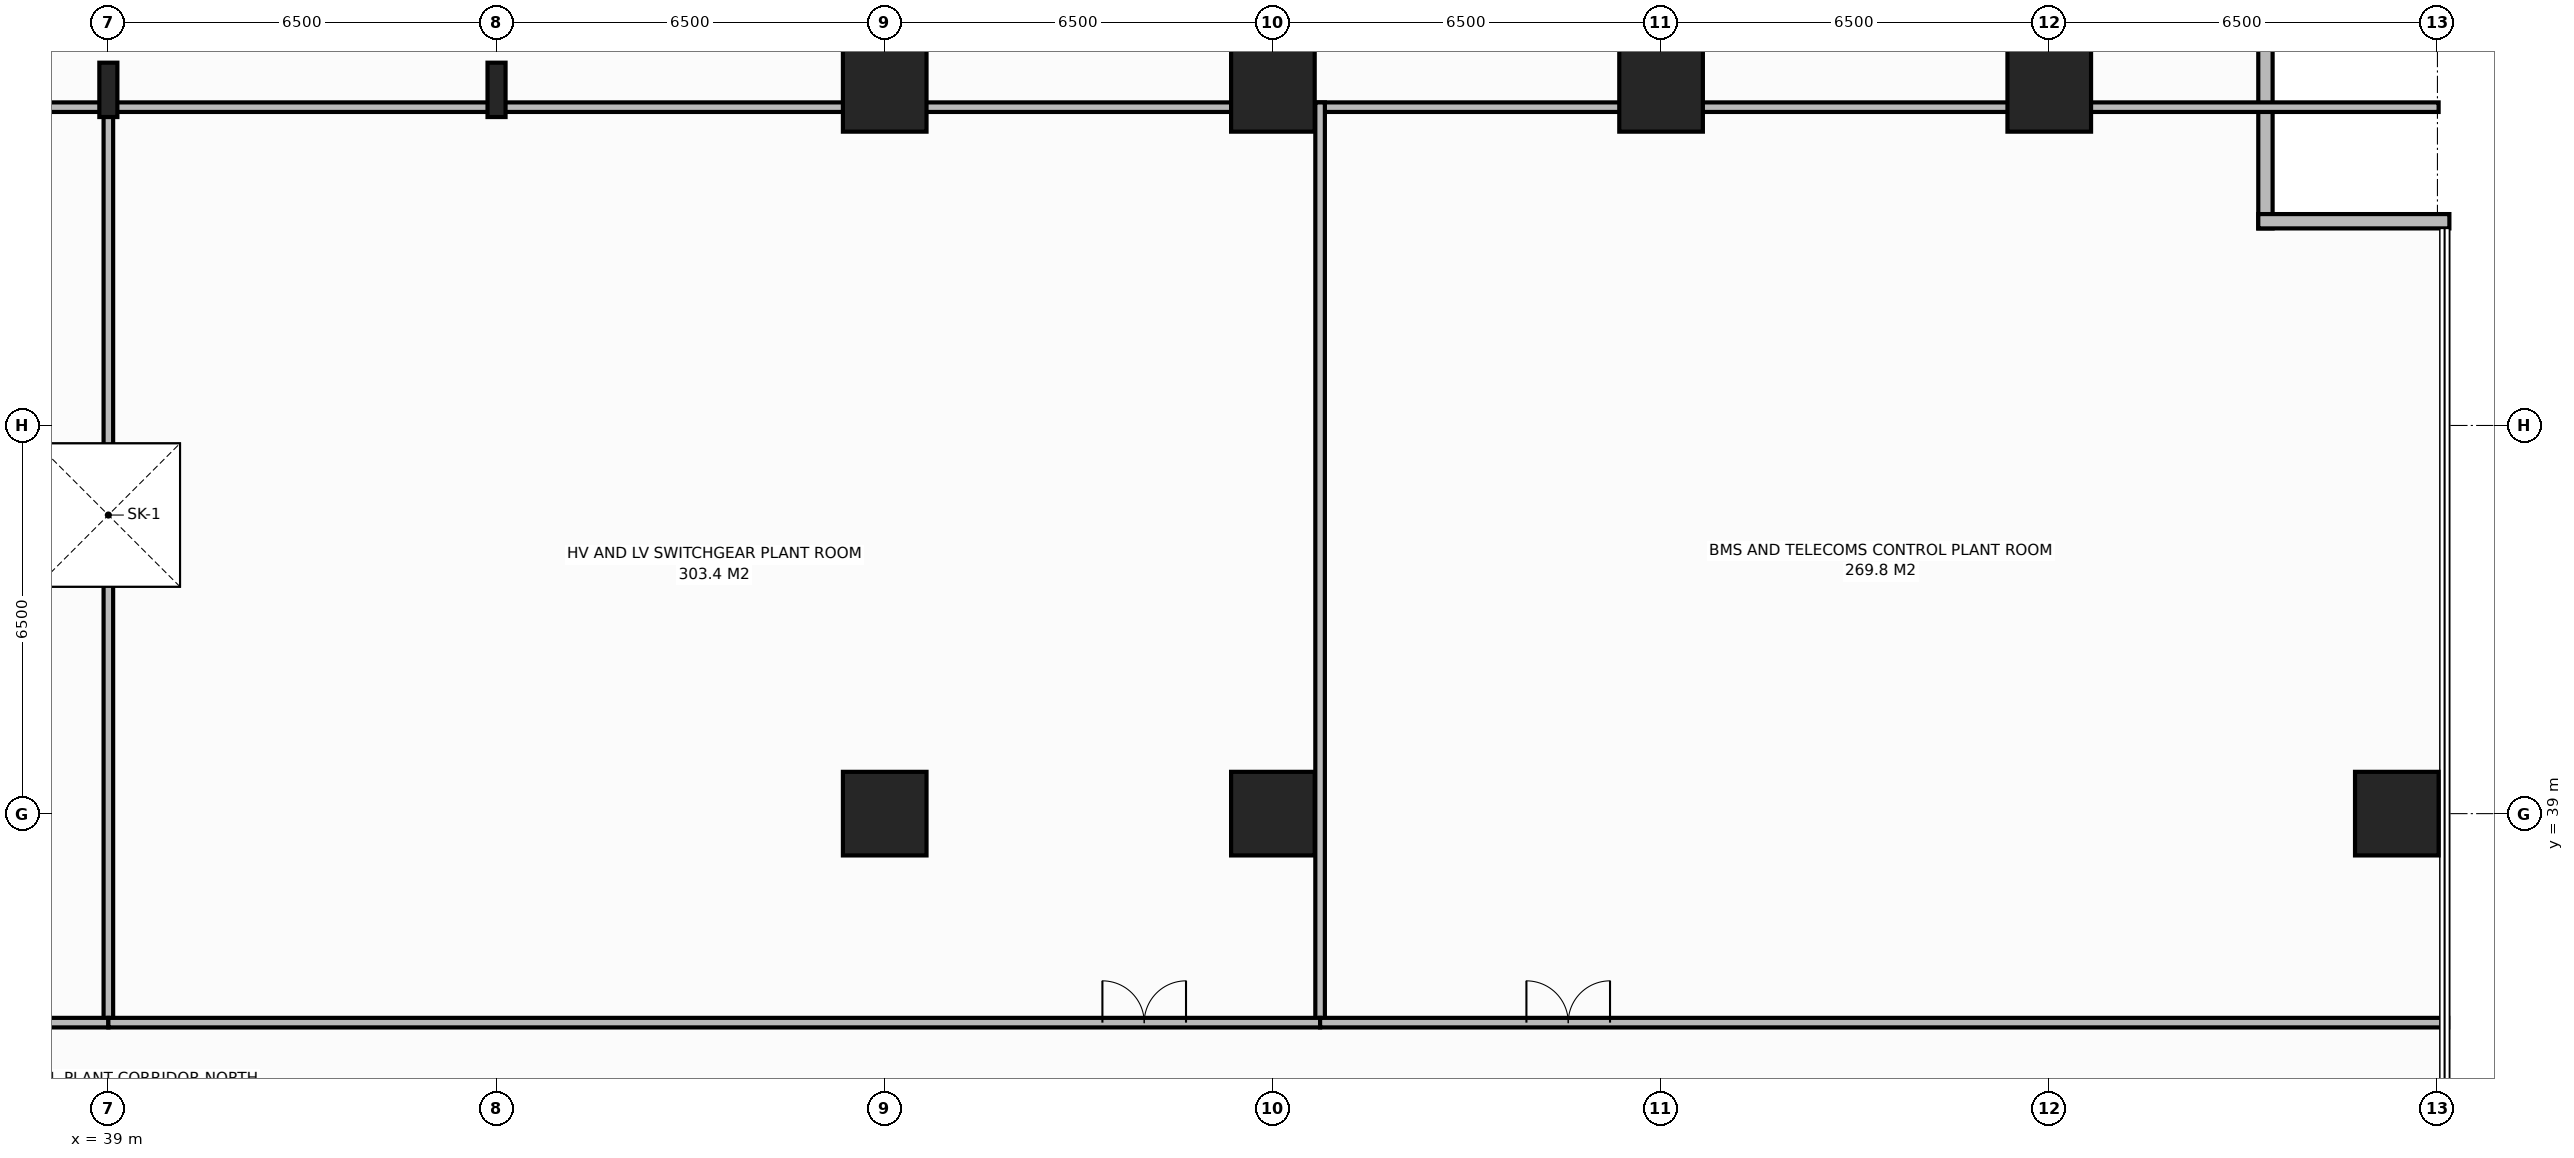
"""IFC4 building model, lengths in metres.
Left out: names, types, materials, properties, quantities, classifications, styles, units other than length and angle.
Written with IfcOpenShell. Run it as: python <this file> out.ifc"""

import sys

from ifc_helpers import new_model, si_unit, direction, frame, frame_2d, origin, origin_2d, place, context, subcontext, project, spatial, rectangle, i_section, extrude, element, fill, save


model = new_model("IFC4")
c1 = context("Model", 3, precision=1e-05, world=origin(), true_north=direction((0.0, 1.0)))
c2 = subcontext(c1, "Body", "Model", "MODEL_VIEW")
j1 = project(units=[si_unit("LENGTHUNIT", "METRE"), si_unit("PLANEANGLEUNIT", "RADIAN")], contexts=[c1])
p1 = place(None, origin())
s1 = spatial("IfcSite", under=j1, at=p1, CompositionType="ELEMENT")
p2 = place(p1, origin())
s2 = spatial("IfcBuilding", under=s1, at=p2, CompositionType="ELEMENT")
p3 = place(p2, frame((0.0, 0.0, 22.0)))
s3 = spatial("IfcBuildingStorey", under=s2, at=p3, CompositionType="ELEMENT", Elevation=22.0)
for number, where, z_axis, x_axis in (
    (1, (58.5, 39.0, 0.0), (0.0, 0.0, 1.0), (1.0, 0.0, 0.0)),
    (2, (52.0, 39.0, 0.0), (0.0, 0.0, 1.0), (1.0, 0.0, 0.0)),
    (3, (52.0, 51.12, 0.0), (0.0, 0.0, 1.0), (1.0, 0.0, 0.0)),
    (4, (58.5, 51.12, 0.0), (0.0, 0.0, 1.0), (1.0, 0.0, 0.0)),
    (5, (65.0, 51.12, 0.0), (0.0, 0.0, 1.0), (1.0, 0.0, 0.0)),
    (6, (71.5, 51.12, 0.0), (0.0, 0.0, 1.0), (1.0, 0.0, 0.0)),
    (7, (77.32, 39.0, 0.0), (0.0, 0.0, 1.0), (1.0, 0.0, 0.0)),
):
    element("IfcColumn", number, at=place(p3, frame(where, z_axis=z_axis, x_axis=x_axis)), inside=s3, PredefinedType="COLUMN", context=c2, shape_type="SweptSolid", body=[
        extrude(rectangle(XDim=1.4, YDim=1.4, at=origin_2d()), origin(), (0.0, 0.0, 1.0), 5.8),
    ])
for number, where, z_axis, x_axis in (
    (8, (39.0, 51.12, 0.0), (0.0, 0.0, 1.0), (1.0, 0.0, 0.0)),
    (9, (45.5, 51.12, 0.0), (0.0, 0.0, 1.0), (1.0, 0.0, 0.0)),
):
    element("IfcColumn", number, at=place(p3, frame(where, z_axis=z_axis, x_axis=x_axis)), inside=s3, PredefinedType="COLUMN", context=c2, shape_type="SweptSolid", body=[
        extrude(i_section(OverallWidth=0.302, OverallDepth=0.91, WebThickness=0.021, FlangeThickness=0.04, at=origin_2d()), origin(), (0.0, 0.0, 1.0), 5.8),
    ])
for number, where, z_axis, x_axis in (
    (10, (75.12, 52.0, 0.0), (0.0, 0.0, 1.0), (0.0, -1.0, 0.0)),
    (11, (75.0, 48.92, 0.0), (0.0, 0.0, 1.0), (1.0, 0.0, 0.0)),
):
    element("IfcWall", number, at=place(p3, frame(where, z_axis=z_axis, x_axis=x_axis)), inside=s3, PredefinedType="STANDARD", context=c2, shape_type="SweptSolid", body=[
        extrude(rectangle(XDim=3.2, YDim=0.24, at=frame_2d((1.6, 0.0))), origin(), (0.0, 0.0, 1.0), 5.55),
    ])
p4 = place(p3, frame((-0.02, 50.83, 0.0), z_axis=(0.0, 0.0, 1.0), x_axis=(1.0, 0.0, 0.0)))
e12 = element("IfcWall", 12, at=p4, inside=s3, PredefinedType="STANDARD", context=c2, shape_type="SweptSolid", body=[
    extrude(rectangle(XDim=78.04, YDim=0.16, at=frame_2d((39.02, 0.0))), origin(), (0.0, 0.0, 1.0), 3.15),
])
p5 = place(p3, frame((39.0, 35.5, 0.0), z_axis=(0.0, 0.0, 1.0), x_axis=(0.0, 1.0, 0.0)))
e13 = element("IfcWall", 13, at=p5, inside=s3, PredefinedType="STANDARD", context=c2, shape_type="SweptSolid", body=[
    extrude(rectangle(XDim=15.41, YDim=0.16, at=frame_2d((7.705, 0.0))), origin(), (0.0, 0.0, 1.0), 4.9),
])
p6 = place(p3, frame((18.71, 35.5, 0.0), z_axis=(0.0, 0.0, 1.0), x_axis=(1.0, 0.0, 0.0)))
e14 = element("IfcWall", 14, at=p6, inside=s3, PredefinedType="STANDARD", context=c2, shape_type="SweptSolid", body=[
    extrude(rectangle(XDim=20.29, YDim=0.16, at=frame_2d((10.145, 0.0))), origin(), (0.0, 0.0, 1.0), 5.55),
])
p7 = place(p6, frame((2.245, 0.0, 0.0)))
e15 = element("IfcOpeningElement", 15, at=p7, cuts=e14, PredefinedType="OPENING", context=c2, shape_type="SweptSolid", body=[
    extrude(rectangle(XDim=1.4, YDim=2.2, at=frame_2d((0.7, 1.1))), frame((0.0, 0.09, 0.0), z_axis=(0.0, -1.0, 0.0), x_axis=(1.0, 0.0, 0.0)), (0.0, 0.0, 1.0), 0.18),
])
p8 = place(p3, frame((59.29, 35.5, 0.0), z_axis=(0.0, 0.0, 1.0), x_axis=(0.0, 1.0, 0.0)))
e16 = element("IfcWall", 16, at=p8, inside=s3, PredefinedType="STANDARD", context=c2, shape_type="SweptSolid", body=[
    extrude(rectangle(XDim=15.41, YDim=0.16, at=frame_2d((7.705, 0.0))), origin(), (0.0, 0.0, 1.0), 5.55),
])
p9 = place(p3, frame((39.0, 35.5, 0.0), z_axis=(0.0, 0.0, 1.0), x_axis=(1.0, 0.0, 0.0)))
e17 = element("IfcWall", 17, at=p9, inside=s3, PredefinedType="STANDARD", context=c2, shape_type="SweptSolid", body=[
    extrude(rectangle(XDim=20.29, YDim=0.16, at=frame_2d((10.145, 0.0))), origin(), (0.0, 0.0, 1.0), 5.55),
])
p10 = place(p9, frame((16.645, 0.0, 0.0)))
e18 = element("IfcOpeningElement", 18, at=p10, cuts=e17, PredefinedType="OPENING", context=c2, shape_type="SweptSolid", body=[
    extrude(rectangle(XDim=1.4, YDim=2.2, at=frame_2d((0.7, 1.1))), frame((0.0, 0.09, 0.0), z_axis=(0.0, -1.0, 0.0), x_axis=(1.0, 0.0, 0.0)), (0.0, 0.0, 1.0), 0.18),
])
p11 = place(p3, frame((59.29, 35.5, 0.0), z_axis=(0.0, 0.0, 1.0), x_axis=(1.0, 0.0, 0.0)))
e19 = element("IfcWall", 19, at=p11, inside=s3, PredefinedType="STANDARD", context=c2, shape_type="SweptSolid", body=[
    extrude(rectangle(XDim=18.89, YDim=0.16, at=frame_2d((9.445, 0.0))), origin(), (0.0, 0.0, 1.0), 5.55),
])
p12 = place(p11, frame((3.455, 0.0, 0.0)))
e20 = element("IfcOpeningElement", 20, at=p12, cuts=e19, PredefinedType="OPENING", context=c2, shape_type="SweptSolid", body=[
    extrude(rectangle(XDim=1.4, YDim=2.2, at=frame_2d((0.7, 1.1))), frame((0.0, 0.09, 0.0), z_axis=(0.0, -1.0, 0.0), x_axis=(1.0, 0.0, 0.0)), (0.0, 0.0, 1.0), 0.18),
])
p13 = place(p3, frame((0.0, 0.0, -0.6)))
p14 = place(p13, frame((39.0, 44.0, 0.0)))
p15 = place(p14, frame((0.0, 0.0, 0.55)))
e21 = element("IfcWindow", 21, at=p15, inside=s3, PartitioningType="SINGLE_PANEL", PredefinedType="SKYLIGHT", context=c2, shape_type="SweptSolid", body=[
    extrude(rectangle(XDim=2.4, YDim=2.4, at=origin_2d()), origin(), (0.0, 0.0, 1.0), 0.05),
])
p16 = place(p10, origin())
e22 = element("IfcDoor", 22, at=p16, inside=s3, OperationType="DOUBLE_DOOR_SINGLE_SWING", PredefinedType="DOOR", context=c2, shape_type="SweptSolid", body=[
    extrude(rectangle(XDim=1.4, YDim=2.2, at=frame_2d((0.7, 1.1))), frame((0.0, 0.025, 0.0), z_axis=(0.0, -1.0, 0.0), x_axis=(1.0, 0.0, 0.0)), (0.0, 0.0, 1.0), 0.05),
])
fill(e18, e22)
p17 = place(p12, origin())
e23 = element("IfcDoor", 23, at=p17, inside=s3, OperationType="DOUBLE_DOOR_SINGLE_SWING", PredefinedType="DOOR", context=c2, shape_type="SweptSolid", body=[
    extrude(rectangle(XDim=1.4, YDim=2.2, at=frame_2d((0.7, 1.1))), frame((0.0, 0.025, 0.0), z_axis=(0.0, -1.0, 0.0), x_axis=(1.0, 0.0, 0.0)), (0.0, 0.0, 1.0), 0.05),
])
fill(e20, e23)
save(model, sys.argv[1])
